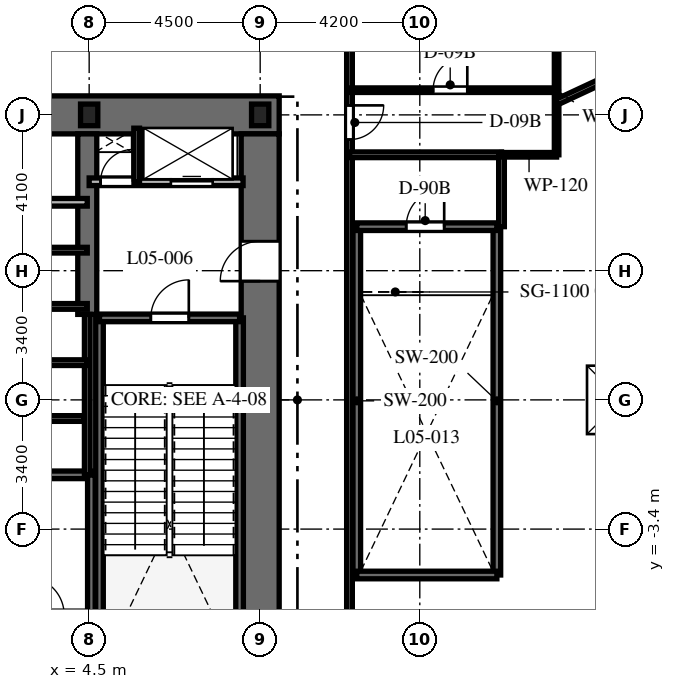
"""IFC4 building model, lengths in metres.
Left out: names, types, materials, properties, quantities, classifications, styles, units other than length and angle.
Written with IfcOpenShell. Run it as: python <this file> out.ifc"""

import sys

from ifc_helpers import new_model, si_unit, direction, frame, frame_2d, origin, origin_2d, place, context, subcontext, project, spatial, rectangle, i_section, extrude, element, fill, save


model = new_model("IFC4")
c1 = context("Model", 3, precision=1e-05, world=origin(), true_north=direction((0.0, 1.0)))
c2 = subcontext(c1, "Body", "Model", "MODEL_VIEW")
j1 = project(units=[si_unit("LENGTHUNIT", "METRE"), si_unit("PLANEANGLEUNIT", "RADIAN")], contexts=[c1])
p1 = place(None, origin())
s1 = spatial("IfcSite", under=j1, at=p1, CompositionType="ELEMENT")
p2 = place(p1, origin())
s2 = spatial("IfcBuilding", under=s1, at=p2, CompositionType="ELEMENT")
p3 = place(p2, frame((0.0, 0.0, 28.2)))
s3 = spatial("IfcBuildingStorey", under=s2, at=p3, CompositionType="ELEMENT", Elevation=28.2)
p4 = place(p3, frame((1.85, 7.5, 0.0), z_axis=(0.0, 0.0, 1.0), x_axis=(1.0, 0.0, 0.0)))
e1 = element("IfcWall", 1, at=p4, inside=s3, PredefinedType="SHEAR", context=c2, shape_type="SweptSolid", body=[
    extrude(rectangle(XDim=7.65, YDim=1.0, at=frame_2d((3.825, 0.0))), origin(), (0.0, 0.0, 1.0), 6.0),
])
p5 = place(p3, frame((9.0, -7.0, 0.0), z_axis=(0.0, 0.0, 1.0), x_axis=(0.0, 1.0, 0.0)))
e2 = element("IfcWall", 2, at=p5, inside=s3, PredefinedType="SHEAR", context=c2, shape_type="SweptSolid", body=[
    extrude(rectangle(XDim=14.0, YDim=1.0, at=frame_2d((7.0, 0.0))), origin(), (0.0, 0.0, 1.0), 6.0),
])
p6 = place(p5, frame((10.125, 0.0, 0.0)))
e3 = element("IfcOpeningElement", 3, at=p6, cuts=e2, PredefinedType="OPENING", context=c2, shape_type="SweptSolid", body=[
    extrude(rectangle(XDim=1.05, YDim=2.15, at=frame_2d((0.525, 1.075))), frame((0.0, 0.51, 0.0), z_axis=(0.0, -1.0, 0.0), x_axis=(1.0, 0.0, 0.0)), (0.0, 0.0, 1.0), 1.02),
])
p7 = place(p3, frame((4.45, 2.25, 0.0), z_axis=(0.0, 0.0, 1.0), x_axis=(0.0, 1.0, 0.0)))
e4 = element("IfcWall", 4, at=p7, inside=s3, PredefinedType="SHEAR", context=c2, shape_type="SweptSolid", body=[
    extrude(rectangle(XDim=4.75, YDim=0.5, at=frame_2d((2.375, 0.0))), origin(), (0.0, 0.0, 1.0), 6.0),
])
for number, where, z_axis, x_axis in (
    (5, (4.772, -6.985, 0.0), (0.0, 0.0, 1.0), (0.0, 1.0, 0.0)),
    (6, (8.458, -6.985, 0.0), (0.0, 0.0, 1.0), (0.0, 1.0, 0.0)),
):
    element("IfcWall", number, at=place(p3, frame(where, z_axis=z_axis, x_axis=x_axis)), inside=s3, PredefinedType="SHEAR", context=c2, shape_type="SweptSolid", body=[
        extrude(rectangle(XDim=9.143, YDim=0.2, at=frame_2d((4.572, 0.0))), origin(), (0.0, 0.0, 1.0), 6.0),
    ])
p8 = place(p3, frame((4.772, 2.158, 0.0), z_axis=(0.0, 0.0, 1.0), x_axis=(1.0, 0.0, 0.0)))
e7 = element("IfcWall", 7, at=p8, inside=s3, PredefinedType="SHEAR", context=c2, shape_type="SweptSolid", body=[
    extrude(rectangle(XDim=3.686, YDim=0.2, at=frame_2d((1.843, 0.0))), origin(), (0.0, 0.0, 1.0), 6.0),
])
p9 = place(p8, frame((1.35, 0.0, 0.0)))
e8 = element("IfcOpeningElement", 8, at=p9, cuts=e7, PredefinedType="OPENING", context=c2, shape_type="SweptSolid", body=[
    extrude(rectangle(XDim=1.0, YDim=2.15, at=frame_2d((0.5, 1.075))), frame((0.0, 0.11, 0.0), z_axis=(0.0, -1.0, 0.0), x_axis=(1.0, 0.0, 0.0)), (0.0, 0.0, 1.0), 0.22),
])
p10 = place(p3, frame((-4.608, -1.972, 0.0), z_axis=(0.0, 0.0, 1.0), x_axis=(1.0, 0.0, 0.0)))
e9 = element("IfcWall", 9, at=p10, inside=s3, PredefinedType="SHEAR", context=c2, shape_type="SweptSolid", body=[
    extrude(rectangle(XDim=9.166, YDim=0.2, at=frame_2d((4.583, 0.0))), origin(), (0.0, 0.0, 1.0), 6.0),
])
p11 = place(p3, frame((4.558, -5.658, 0.0), z_axis=(0.0, 0.0, 1.0), x_axis=(0.0, 1.0, 0.0)))
e10 = element("IfcWall", 10, at=p11, inside=s3, PredefinedType="SHEAR", context=c2, shape_type="SweptSolid", body=[
    extrude(rectangle(XDim=3.686, YDim=0.2, at=frame_2d((1.843, 0.0))), origin(), (0.0, 0.0, 1.0), 6.0),
])
for number, where, z_axis, x_axis in (
    (11, (11.542, -4.608, 0.0), (0.0, 0.0, 1.0), (0.0, 1.0, 0.0)),
    (12, (15.228, -4.608, 0.0), (0.0, 0.0, 1.0), (0.0, 1.0, 0.0)),
):
    element("IfcWall", number, at=place(p3, frame(where, z_axis=z_axis, x_axis=x_axis)), inside=s3, PredefinedType="SHEAR", context=c2, shape_type="SweptSolid", body=[
        extrude(rectangle(XDim=9.166, YDim=0.2, at=frame_2d((4.583, 0.0))), origin(), (0.0, 0.0, 1.0), 6.0),
    ])
p12 = place(p3, frame((11.542, -4.608, 0.0), z_axis=(0.0, 0.0, 1.0), x_axis=(1.0, 0.0, 0.0)))
e13 = element("IfcWall", 13, at=p12, inside=s3, PredefinedType="SHEAR", context=c2, shape_type="SweptSolid", body=[
    extrude(rectangle(XDim=3.686, YDim=0.2, at=frame_2d((1.843, 0.0))), origin(), (0.0, 0.0, 1.0), 6.0),
])
p13 = place(p3, frame((11.542, 4.558, 0.0), z_axis=(0.0, 0.0, 1.0), x_axis=(1.0, 0.0, 0.0)))
e14 = element("IfcWall", 14, at=p13, inside=s3, PredefinedType="SHEAR", context=c2, shape_type="SweptSolid", body=[
    extrude(rectangle(XDim=3.686, YDim=0.2, at=frame_2d((1.843, 0.0))), origin(), (0.0, 0.0, 1.0), 6.0),
])
p14 = place(p13, frame((1.3, 0.0, 0.0)))
e15 = element("IfcOpeningElement", 15, at=p14, cuts=e14, PredefinedType="OPENING", context=c2, shape_type="SweptSolid", body=[
    extrude(rectangle(XDim=1.0, YDim=2.15, at=frame_2d((0.5, 1.075))), frame((0.0, 0.11, 0.0), z_axis=(0.0, -1.0, 0.0), x_axis=(1.0, 0.0, 0.0)), (0.0, 0.0, 1.0), 0.22),
])
for number, where, z_axis, x_axis in (
    (16, (9.0, 7.5, 0.0), (0.0, 0.0, 1.0), (1.0, 0.0, 0.0)),
    (17, (4.5, 7.5, 0.0), (0.0, 0.0, 1.0), (1.0, 0.0, 0.0)),
):
    element("IfcColumn", number, at=place(p3, frame(where, z_axis=z_axis, x_axis=x_axis)), inside=s3, PredefinedType="COLUMN", context=c2, shape_type="SweptSolid", body=[
        extrude(i_section(OverallWidth=0.454, OverallDepth=0.569, WebThickness=0.078, FlangeThickness=0.125, at=origin_2d()), origin(), (0.0, 0.0, 1.0), 6.0),
    ])
p15 = place(p3, frame((4.5, 5.74, 0.0), z_axis=(0.0, 0.0, 1.0), x_axis=(1.0, 0.0, 0.0)))
e18 = element("IfcWall", 18, at=p15, inside=s3, PredefinedType="PARTITIONING", context=c2, shape_type="SweptSolid", body=[
    extrude(rectangle(XDim=4.05, YDim=0.2, at=frame_2d((2.025, 0.0))), origin(), (0.0, 0.0, 1.0), 5.7),
])
p16 = place(p15, frame((0.3, 0.0, 0.0)))
e19 = element("IfcOpeningElement", 19, at=p16, cuts=e18, PredefinedType="OPENING", context=c2, shape_type="SweptSolid", body=[
    extrude(rectangle(XDim=0.85, YDim=2.03, at=frame_2d((0.425, 1.015))), frame((0.0, 0.11, 0.0), z_axis=(0.0, -1.0, 0.0), x_axis=(1.0, 0.0, 0.0)), (0.0, 0.0, 1.0), 0.22),
])
p17 = place(p15, frame((2.15, 0.0, 0.0)))
e20 = element("IfcOpeningElement", 20, at=p17, cuts=e18, PredefinedType="OPENING", context=c2, shape_type="SweptSolid", body=[
    extrude(rectangle(XDim=1.1, YDim=2.2, at=frame_2d((0.55, 1.1))), frame((0.0, 0.11, 0.0), z_axis=(0.0, -1.0, 0.0), x_axis=(1.0, 0.0, 0.0)), (0.0, 0.0, 1.0), 0.22),
])
p18 = place(p3, frame((5.75, 5.74, 0.0), z_axis=(0.0, 0.0, 1.0), x_axis=(0.0, 1.0, 0.0)))
e21 = element("IfcWall", 21, at=p18, inside=s3, PredefinedType="PARTITIONING", context=c2, shape_type="SweptSolid", body=[
    extrude(rectangle(XDim=1.41, YDim=0.15, at=frame_2d((0.705, 0.0))), origin(), (0.0, 0.0, 1.0), 5.7),
])
p19 = place(p3, frame((1.85, 5.2, 0.0), z_axis=(0.0, 0.0, 1.0), x_axis=(1.0, 0.0, 0.0)))
e22 = element("IfcWall", 22, at=p19, inside=s3, PredefinedType="PARTITIONING", context=c2, shape_type="SweptSolid", body=[
    extrude(rectangle(XDim=2.6, YDim=0.2, at=frame_2d((1.3, 0.0))), origin(), (0.0, 0.0, 1.0), 5.7),
])
p20 = place(p3, frame((4.45, -1.972, 0.0), z_axis=(0.0, 0.0, 1.0), x_axis=(0.0, 1.0, 0.0)))
e23 = element("IfcWall", 23, at=p20, inside=s3, PredefinedType="PARTITIONING", context=c2, shape_type="SweptSolid", body=[
    extrude(rectangle(XDim=4.222, YDim=0.15, at=frame_2d((2.111, 0.0))), origin(), (0.0, 0.0, 1.0), 5.7),
])
for number, where, z_axis, x_axis in (
    (24, (1.9, 3.94, 0.0), (0.0, 0.0, 1.0), (1.0, 0.0, 0.0)),
    (25, (1.9, 0.98, 0.0), (0.0, 0.0, 1.0), (1.0, 0.0, 0.0)),
    (26, (1.9, 2.46, 0.0), (0.0, 0.0, 1.0), (1.0, 0.0, 0.0)),
):
    element("IfcWall", number, at=place(p3, frame(where, z_axis=z_axis, x_axis=x_axis)), inside=s3, PredefinedType="PARTITIONING", context=c2, shape_type="SweptSolid", body=[
        extrude(rectangle(XDim=2.55, YDim=0.15, at=frame_2d((1.275, 0.0))), origin(), (0.0, 0.0, 1.0), 5.7),
    ])
p21 = place(p3, frame((-4.36, -0.49, 0.0), z_axis=(0.0, 0.0, 1.0), x_axis=(1.0, 0.0, 0.0)))
e27 = element("IfcWall", 27, at=p21, inside=s3, PredefinedType="PARTITIONING", context=c2, shape_type="SweptSolid", body=[
    extrude(rectangle(XDim=8.72, YDim=0.15, at=frame_2d((4.36, 0.0))), origin(), (0.0, 0.0, 1.0), 5.7),
])
p22 = place(p21, frame((2.81, 0.0, 0.0)))
e28 = element("IfcOpeningElement", 28, at=p22, cuts=e27, PredefinedType="OPENING", context=c2, shape_type="SweptSolid", body=[
    extrude(rectangle(XDim=0.85, YDim=2.03, at=frame_2d((0.425, 1.015))), frame((0.0, 0.085, 0.0), z_axis=(0.0, -1.0, 0.0), x_axis=(1.0, 0.0, 0.0)), (0.0, 0.0, 1.0), 0.17),
])
p23 = place(p21, frame((4.61, 0.0, 0.0)))
e29 = element("IfcOpeningElement", 29, at=p23, cuts=e27, PredefinedType="OPENING", context=c2, shape_type="SweptSolid", body=[
    extrude(rectangle(XDim=0.85, YDim=2.03, at=frame_2d((0.425, 1.015))), frame((0.0, 0.085, 0.0), z_axis=(0.0, -1.0, 0.0), x_axis=(1.0, 0.0, 0.0)), (0.0, 0.0, 1.0), 0.17),
])
p24 = place(p3, frame((11.35, 9.85, 0.0), z_axis=(0.0, 0.0, 1.0), x_axis=(0.0, -1.0, 0.0)))
e30 = element("IfcWall", 30, at=p24, inside=s3, PredefinedType="PARTITIONING", context=c2, shape_type="SweptSolid", body=[
    extrude(rectangle(XDim=19.7, YDim=0.15, at=frame_2d((9.85, 0.0))), origin(), (0.0, 0.0, 1.0), 3.89),
])
p25 = place(p24, frame((2.1, 0.0, 0.0)))
e31 = element("IfcOpeningElement", 31, at=p25, cuts=e30, PredefinedType="OPENING", context=c2, shape_type="SweptSolid", body=[
    extrude(rectangle(XDim=0.9, YDim=2.03, at=frame_2d((0.45, 1.015))), frame((0.0, 0.085, 0.0), z_axis=(0.0, -1.0, 0.0), x_axis=(1.0, 0.0, 0.0)), (0.0, 0.0, 1.0), 0.17),
])
p26 = place(p24, frame((16.875, 0.0, 0.0)))
e32 = element("IfcOpeningElement", 32, at=p26, cuts=e30, PredefinedType="OPENING", context=c2, shape_type="SweptSolid", body=[
    extrude(rectangle(XDim=1.0, YDim=2.03, at=frame_2d((0.5, 1.015))), frame((0.0, 0.085, 0.0), z_axis=(0.0, -1.0, 0.0), x_axis=(1.0, 0.0, 0.0)), (0.0, 0.0, 1.0), 0.17),
])
p27 = place(p3, frame((11.35, 6.45, 0.0), z_axis=(0.0, 0.0, 1.0), x_axis=(1.0, 0.0, 0.0)))
e33 = element("IfcWall", 33, at=p27, inside=s3, PredefinedType="PARTITIONING", context=c2, shape_type="SweptSolid", body=[
    extrude(rectangle(XDim=4.0, YDim=0.15, at=frame_2d((2.0, 0.0))), origin(), (0.0, 0.0, 1.0), 3.89),
])
p28 = place(p3, frame((15.35, 4.558, 0.0), z_axis=(0.0, 0.0, 1.0), x_axis=(0.0, 1.0, 0.0)))
e34 = element("IfcWall", 34, at=p28, inside=s3, PredefinedType="PARTITIONING", context=c2, shape_type="SweptSolid", body=[
    extrude(rectangle(XDim=1.892, YDim=0.15, at=frame_2d((0.946, 0.0))), origin(), (0.0, 0.0, 1.0), 3.89),
])
p29 = place(p3, frame((15.35, 6.45, 0.0), z_axis=(0.0, 0.0, 1.0), x_axis=(1.0, 0.0, 0.0)))
e35 = element("IfcWall", 35, at=p29, inside=s3, PredefinedType="PARTITIONING", context=c2, shape_type="SweptSolid", body=[
    extrude(rectangle(XDim=1.45, YDim=0.12, at=frame_2d((0.725, 0.0))), origin(), (0.0, 0.0, 1.0), 3.89),
])
p30 = place(p3, frame((16.8, 6.45, 0.0), z_axis=(0.0, 0.0, 1.0), x_axis=(0.0, 1.0, 0.0)))
e36 = element("IfcWall", 36, at=p30, inside=s3, PredefinedType="PARTITIONING", context=c2, shape_type="SweptSolid", body=[
    extrude(rectangle(XDim=3.4, YDim=0.12, at=frame_2d((1.7, 0.0))), origin(), (0.0, 0.0, 1.0), 3.89),
])
p31 = place(p3, frame((11.35, 8.15, 0.0), z_axis=(0.0, 0.0, 1.0), x_axis=(1.0, 0.0, 0.0)))
e37 = element("IfcWall", 37, at=p31, inside=s3, PredefinedType="PARTITIONING", context=c2, shape_type="SweptSolid", body=[
    extrude(rectangle(XDim=5.45, YDim=0.12, at=frame_2d((2.725, 0.0))), origin(), (0.0, 0.0, 1.0), 5.7),
])
p32 = place(p31, frame((2.2, 0.0, 0.0)))
e38 = element("IfcOpeningElement", 38, at=p32, cuts=e37, PredefinedType="OPENING", context=c2, shape_type="SweptSolid", body=[
    extrude(rectangle(XDim=0.9, YDim=2.03, at=frame_2d((0.45, 1.015))), frame((0.0, 0.07, 0.0), z_axis=(0.0, -1.0, 0.0), x_axis=(1.0, 0.0, 0.0)), (0.0, 0.0, 1.0), 0.14),
])
p33 = place(p3, frame((16.8, 7.834, 0.0), z_axis=(0.0, 0.0, 1.0), x_axis=(0.906303781235, 0.422626852104, 0.0)))
e39 = element("IfcWall", 39, at=p33, inside=s3, PredefinedType="PARTITIONING", context=c2, shape_type="SweptSolid", body=[
    extrude(rectangle(XDim=6.822, YDim=0.15, at=frame_2d((3.411, 0.0))), origin(), (0.0, 0.0, 1.0), 2.89),
])
p34 = place(p3, frame((0.0, 0.0, -0.32)))
p35 = place(p34, frame((18.5, 0.0, 0.27)))
e40 = element("IfcWindow", 40, at=p35, inside=s3, PartitioningType="SINGLE_PANEL", PredefinedType="SKYLIGHT", context=c2, shape_type="SweptSolid", body=[
    extrude(rectangle(XDim=1.8, YDim=1.8, at=origin_2d()), origin(), (0.0, 0.0, 1.0), 0.05),
])
p36 = place(p9, origin())
e41 = element("IfcDoor", 41, at=p36, inside=s3, OperationType="SINGLE_SWING_RIGHT", PredefinedType="DOOR", context=c2, shape_type="SweptSolid", body=[
    extrude(rectangle(XDim=1.0, YDim=2.15, at=frame_2d((0.5, 1.075))), frame((0.0, 0.025, 0.0), z_axis=(0.0, -1.0, 0.0), x_axis=(1.0, 0.0, 0.0)), (0.0, 0.0, 1.0), 0.05),
])
fill(e8, e41)
p37 = place(p6, origin())
e42 = element("IfcDoor", 42, at=p37, inside=s3, OperationType="SINGLE_SWING_LEFT", PredefinedType="DOOR", context=c2, shape_type="SweptSolid", body=[
    extrude(rectangle(XDim=1.05, YDim=2.15, at=frame_2d((0.525, 1.075))), frame((0.0, 0.025, 0.0), z_axis=(0.0, -1.0, 0.0), x_axis=(1.0, 0.0, 0.0)), (0.0, 0.0, 1.0), 0.05),
])
fill(e3, e42)
p38 = place(p16, origin())
e43 = element("IfcDoor", 43, at=p38, inside=s3, OperationType="SINGLE_SWING_RIGHT", PredefinedType="DOOR", context=c2, shape_type="SweptSolid", body=[
    extrude(rectangle(XDim=0.85, YDim=2.03, at=frame_2d((0.425, 1.015))), frame((0.0, 0.025, 0.0), z_axis=(0.0, -1.0, 0.0), x_axis=(1.0, 0.0, 0.0)), (0.0, 0.0, 1.0), 0.05),
])
fill(e19, e43)
p39 = place(p17, origin())
e44 = element("IfcDoor", 44, at=p39, inside=s3, OperationType="SLIDING_TO_RIGHT", PredefinedType="DOOR", context=c2, shape_type="SweptSolid", body=[
    extrude(rectangle(XDim=1.1, YDim=2.2, at=frame_2d((0.55, 1.1))), frame((0.0, 0.025, 0.0), z_axis=(0.0, -1.0, 0.0), x_axis=(1.0, 0.0, 0.0)), (0.0, 0.0, 1.0), 0.05),
])
fill(e20, e44)
p40 = place(p14, origin())
e45 = element("IfcDoor", 45, at=p40, inside=s3, OperationType="SINGLE_SWING_RIGHT", PredefinedType="DOOR", context=c2, shape_type="SweptSolid", body=[
    extrude(rectangle(XDim=1.0, YDim=2.15, at=frame_2d((0.5, 1.075))), frame((0.0, 0.025, 0.0), z_axis=(0.0, -1.0, 0.0), x_axis=(1.0, 0.0, 0.0)), (0.0, 0.0, 1.0), 0.05),
])
fill(e15, e45)
p41 = place(p25, origin())
e46 = element("IfcDoor", 46, at=p41, inside=s3, OperationType="SINGLE_SWING_LEFT", PredefinedType="DOOR", context=c2, shape_type="SweptSolid", body=[
    extrude(rectangle(XDim=0.9, YDim=2.03, at=frame_2d((0.45, 1.015))), frame((0.0, 0.025, 0.0), z_axis=(0.0, -1.0, 0.0), x_axis=(1.0, 0.0, 0.0)), (0.0, 0.0, 1.0), 0.05),
])
fill(e31, e46)
p42 = place(p32, origin())
e47 = element("IfcDoor", 47, at=p42, inside=s3, OperationType="SINGLE_SWING_RIGHT", PredefinedType="DOOR", context=c2, shape_type="SweptSolid", body=[
    extrude(rectangle(XDim=0.9, YDim=2.03, at=frame_2d((0.45, 1.015))), frame((0.0, 0.025, 0.0), z_axis=(0.0, -1.0, 0.0), x_axis=(1.0, 0.0, 0.0)), (0.0, 0.0, 1.0), 0.05),
])
fill(e38, e47)
save(model, sys.argv[1])
